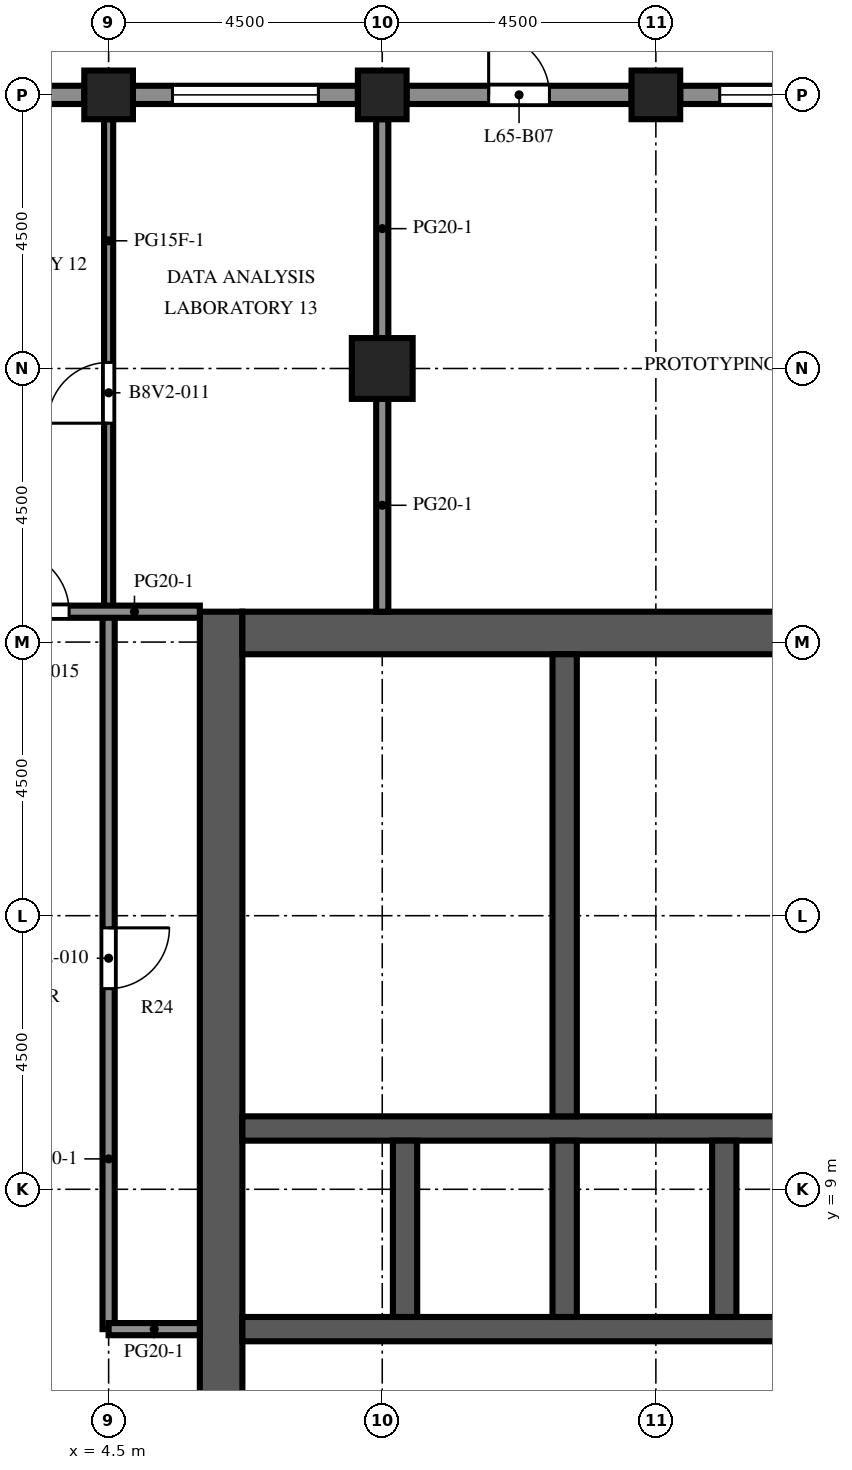
"""IFC4 building model, lengths in metres.
Left out: names, types, materials, properties, quantities, classifications, styles, units other than length and angle.
Written with IfcOpenShell. Run it as: python <this file> out.ifc"""

import sys

from ifc_helpers import new_model, si_unit, direction, frame, frame_2d, origin, origin_2d, place, context, subcontext, project, spatial, rectangle, extrude, element, fill, save


model = new_model("IFC4")
c1 = context("Model", 3, precision=1e-05, world=origin(), true_north=direction((0.0, 1.0)))
c2 = subcontext(c1, "Body", "Model", "MODEL_VIEW")
j1 = project(units=[si_unit("LENGTHUNIT", "METRE"), si_unit("PLANEANGLEUNIT", "RADIAN")], contexts=[c1])
p1 = place(None, origin())
s1 = spatial("IfcSite", under=j1, at=p1, CompositionType="ELEMENT")
p2 = place(p1, origin())
s2 = spatial("IfcBuilding", under=s1, at=p2, CompositionType="ELEMENT")
p3 = place(p2, frame((0.0, 0.0, 286.8)))
s3 = spatial("IfcBuildingStorey", under=s2, at=p3, CompositionType="ELEMENT", Elevation=286.8)
for number, where, z_axis, x_axis in (
    (1, (4.5, 27.0, 0.0), (0.0, 0.0, 1.0), (1.0, 0.0, 0.0)),
    (2, (9.0, 27.0, 0.0), (0.0, 0.0, 1.0), (1.0, 0.0, 0.0)),
    (3, (13.5, 27.0, 0.0), (0.0, 0.0, 1.0), (1.0, 0.0, 0.0)),
):
    element("IfcColumn", number, at=place(p3, frame(where, z_axis=z_axis, x_axis=x_axis)), inside=s3, PredefinedType="COLUMN", context=c2, shape_type="SweptSolid", body=[
        extrude(rectangle(XDim=0.8, YDim=0.8, at=origin_2d()), origin(), (0.0, 0.0, 1.0), 4.1),
    ])
p4 = place(p3, frame((9.0, 22.5, 0.0), z_axis=(0.0, 0.0, 1.0), x_axis=(1.0, 0.0, 0.0)))
e4 = element("IfcColumn", 4, at=p4, inside=s3, PredefinedType="COLUMN", context=c2, shape_type="SweptSolid", body=[
    extrude(rectangle(XDim=1.0, YDim=1.0, at=origin_2d()), origin(), (0.0, 0.0, 1.0), 4.1),
])
p5 = place(p3, frame((6.35, -9.0, 0.0), z_axis=(0.0, 0.0, 1.0), x_axis=(0.0, 1.0, 0.0)))
e5 = element("IfcWall", 5, at=p5, inside=s3, PredefinedType="SHEAR", context=c2, shape_type="SweptSolid", body=[
    extrude(rectangle(XDim=27.5, YDim=0.7, at=frame_2d((13.75, 0.0))), origin(), (0.0, 0.0, 1.0), 4.1),
])
p6 = place(p5, frame((12.55, 0.0, 0.0)))
e6 = element("IfcOpeningElement", 6, at=p6, cuts=e5, PredefinedType="OPENING", context=c2, shape_type="SweptSolid", body=[
    extrude(rectangle(XDim=2.4, YDim=2.4, at=frame_2d((1.2, 1.2))), frame((0.0, 0.36, 0.0), z_axis=(0.0, -1.0, 0.0), x_axis=(1.0, 0.0, 0.0)), (0.0, 0.0, 1.0), 0.72),
])
p7 = place(p5, frame((3.9, 0.0, 0.0)))
e7 = element("IfcOpeningElement", 7, at=p7, cuts=e5, PredefinedType="OPENING", context=c2, shape_type="SweptSolid", body=[
    extrude(rectangle(XDim=1.2, YDim=2.1, at=frame_2d((0.6, 1.05))), frame((0.0, 0.36, 0.0), z_axis=(0.0, -1.0, 0.0), x_axis=(1.0, 0.0, 0.0)), (0.0, 0.0, 1.0), 0.72),
])
p8 = place(p5, frame((22.4, 0.0, 0.0)))
e8 = element("IfcOpeningElement", 8, at=p8, cuts=e5, PredefinedType="OPENING", context=c2, shape_type="SweptSolid", body=[
    extrude(rectangle(XDim=1.2, YDim=2.1, at=frame_2d((0.6, 1.05))), frame((0.0, 0.36, 0.0), z_axis=(0.0, -1.0, 0.0), x_axis=(1.0, 0.0, 0.0)), (0.0, 0.0, 1.0), 0.72),
])
p9 = place(p3, frame((6.7, 18.15, 0.0), z_axis=(0.0, 0.0, 1.0), x_axis=(1.0, 0.0, 0.0)))
e9 = element("IfcWall", 9, at=p9, inside=s3, PredefinedType="SHEAR", context=c2, shape_type="SweptSolid", body=[
    extrude(rectangle(XDim=10.6, YDim=0.7, at=frame_2d((5.3, 0.0))), origin(), (0.0, 0.0, 1.0), 4.1),
])
p10 = place(p3, frame((6.7, 6.7, 0.0), z_axis=(0.0, 0.0, 1.0), x_axis=(1.0, 0.0, 0.0)))
e10 = element("IfcWall", 10, at=p10, inside=s3, PredefinedType="SHEAR", context=c2, shape_type="SweptSolid", body=[
    extrude(rectangle(XDim=10.6, YDim=0.4, at=frame_2d((5.3, 0.0))), origin(), (0.0, 0.0, 1.0), 4.1),
])
p11 = place(p10, frame((3.438, 0.0, 0.0)))
e11 = element("IfcOpeningElement", 11, at=p11, cuts=e10, PredefinedType="OPENING", context=c2, shape_type="SweptSolid", body=[
    extrude(rectangle(XDim=1.1, YDim=2.1, at=frame_2d((0.55, 1.05))), frame((0.0, 0.21, 0.0), z_axis=(0.0, -1.0, 0.0), x_axis=(1.0, 0.0, 0.0)), (0.0, 0.0, 1.0), 0.42),
])
p12 = place(p10, frame((6.062, 0.0, 0.0)))
e12 = element("IfcOpeningElement", 12, at=p12, cuts=e10, PredefinedType="OPENING", context=c2, shape_type="SweptSolid", body=[
    extrude(rectangle(XDim=1.1, YDim=2.1, at=frame_2d((0.55, 1.05))), frame((0.0, 0.21, 0.0), z_axis=(0.0, -1.0, 0.0), x_axis=(1.0, 0.0, 0.0)), (0.0, 0.0, 1.0), 0.42),
])
p13 = place(p10, frame((8.812, 0.0, 0.0)))
e13 = element("IfcOpeningElement", 13, at=p13, cuts=e10, PredefinedType="OPENING", context=c2, shape_type="SweptSolid", body=[
    extrude(rectangle(XDim=1.1, YDim=2.1, at=frame_2d((0.55, 1.05))), frame((0.0, 0.21, 0.0), z_axis=(0.0, -1.0, 0.0), x_axis=(1.0, 0.0, 0.0)), (0.0, 0.0, 1.0), 0.42),
])
p14 = place(p10, frame((0.738, 0.0, 0.0)))
e14 = element("IfcOpeningElement", 14, at=p14, cuts=e10, PredefinedType="OPENING", context=c2, shape_type="SweptSolid", body=[
    extrude(rectangle(XDim=1.0, YDim=2.1, at=frame_2d((0.5, 1.05))), frame((0.0, 0.21, 0.0), z_axis=(0.0, -1.0, 0.0), x_axis=(1.0, 0.0, 0.0)), (0.0, 0.0, 1.0), 0.42),
])
p15 = place(p3, frame((6.7, 10.0, 0.0), z_axis=(0.0, 0.0, 1.0), x_axis=(1.0, 0.0, 0.0)))
e15 = element("IfcWall", 15, at=p15, inside=s3, PredefinedType="SHEAR", context=c2, shape_type="SweptSolid", body=[
    extrude(rectangle(XDim=10.6, YDim=0.4, at=frame_2d((5.3, 0.0))), origin(), (0.0, 0.0, 1.0), 4.1),
])
for number, where, z_axis, x_axis in (
    (16, (9.375, 6.9, 0.0), (0.0, 0.0, 1.0), (0.0, 1.0, 0.0)),
    (17, (12.0, 6.9, 0.0), (0.0, 0.0, 1.0), (0.0, 1.0, 0.0)),
    (18, (14.625, 6.9, 0.0), (0.0, 0.0, 1.0), (0.0, 1.0, 0.0)),
):
    element("IfcWall", number, at=place(p3, frame(where, z_axis=z_axis, x_axis=x_axis)), inside=s3, PredefinedType="SHEAR", context=c2, shape_type="SweptSolid", body=[
        extrude(rectangle(XDim=2.9, YDim=0.4, at=frame_2d((1.45, 0.0))), origin(), (0.0, 0.0, 1.0), 4.1),
    ])
p16 = place(p3, frame((12.0, 10.2, 0.0), z_axis=(0.0, 0.0, 1.0), x_axis=(0.0, 1.0, 0.0)))
e19 = element("IfcWall", 19, at=p16, inside=s3, PredefinedType="SHEAR", context=c2, shape_type="SweptSolid", body=[
    extrude(rectangle(XDim=7.6, YDim=0.4, at=frame_2d((3.8, 0.0))), origin(), (0.0, 0.0, 1.0), 4.1),
])
p17 = place(p3, frame((13.9, 27.0, 0.0), z_axis=(0.0, 0.0, 1.0), x_axis=(1.0, 0.0, 0.0)))
e20 = element("IfcWall", 20, at=p17, inside=s3, PredefinedType="SOLIDWALL", context=c2, shape_type="SweptSolid", body=[
    extrude(rectangle(XDim=3.7, YDim=0.3, at=frame_2d((1.85, 0.0))), origin(), (0.0, 0.0, 1.0), 2.85),
])
p18 = place(p17, frame((0.65, 0.0, 0.8)))
e21 = element("IfcOpeningElement", 21, at=p18, cuts=e20, PredefinedType="OPENING", context=c2, shape_type="SweptSolid", body=[
    extrude(rectangle(XDim=2.4, YDim=1.7, at=frame_2d((1.2, 0.85))), frame((0.0, 0.16, 0.0), z_axis=(0.0, -1.0, 0.0), x_axis=(1.0, 0.0, 0.0)), (0.0, 0.0, 1.0), 0.32),
])
p19 = place(p3, frame((9.4, 27.0, 0.0), z_axis=(0.0, 0.0, 1.0), x_axis=(1.0, 0.0, 0.0)))
e22 = element("IfcWall", 22, at=p19, inside=s3, PredefinedType="SOLIDWALL", context=c2, shape_type="SweptSolid", body=[
    extrude(rectangle(XDim=3.7, YDim=0.3, at=frame_2d((1.85, 0.0))), origin(), (0.0, 0.0, 1.0), 2.85),
])
p20 = place(p19, frame((1.35, 0.0, 0.0)))
e23 = element("IfcOpeningElement", 23, at=p20, cuts=e22, PredefinedType="OPENING", context=c2, shape_type="SweptSolid", body=[
    extrude(rectangle(XDim=1.0, YDim=2.2, at=frame_2d((0.5, 1.1))), frame((0.0, 0.16, 0.0), z_axis=(0.0, -1.0, 0.0), x_axis=(1.0, 0.0, 0.0)), (0.0, 0.0, 1.0), 0.32),
])
p21 = place(p3, frame((4.9, 27.0, 0.0), z_axis=(0.0, 0.0, 1.0), x_axis=(1.0, 0.0, 0.0)))
e24 = element("IfcWall", 24, at=p21, inside=s3, PredefinedType="SOLIDWALL", context=c2, shape_type="SweptSolid", body=[
    extrude(rectangle(XDim=3.7, YDim=0.3, at=frame_2d((1.85, 0.0))), origin(), (0.0, 0.0, 1.0), 2.85),
])
p22 = place(p21, frame((0.65, 0.0, 0.8)))
e25 = element("IfcOpeningElement", 25, at=p22, cuts=e24, PredefinedType="OPENING", context=c2, shape_type="SweptSolid", body=[
    extrude(rectangle(XDim=2.4, YDim=1.7, at=frame_2d((1.2, 0.85))), frame((0.0, 0.16, 0.0), z_axis=(0.0, -1.0, 0.0), x_axis=(1.0, 0.0, 0.0)), (0.0, 0.0, 1.0), 0.32),
])
p23 = place(p3, frame((0.4, 27.0, 0.0), z_axis=(0.0, 0.0, 1.0), x_axis=(1.0, 0.0, 0.0)))
e26 = element("IfcWall", 26, at=p23, inside=s3, PredefinedType="SOLIDWALL", context=c2, shape_type="SweptSolid", body=[
    extrude(rectangle(XDim=3.7, YDim=0.3, at=frame_2d((1.85, 0.0))), origin(), (0.0, 0.0, 1.0), 2.85),
])
p24 = place(p23, frame((0.65, 0.0, 0.8)))
e27 = element("IfcOpeningElement", 27, at=p24, cuts=e26, PredefinedType="OPENING", context=c2, shape_type="SweptSolid", body=[
    extrude(rectangle(XDim=2.4, YDim=1.7, at=frame_2d((1.2, 0.85))), frame((0.0, 0.16, 0.0), z_axis=(0.0, -1.0, 0.0), x_axis=(1.0, 0.0, 0.0)), (0.0, 0.0, 1.0), 0.32),
])
p25 = place(p3, frame((8.1, 10.2, 0.0), z_axis=(0.0, 0.0, 1.0), x_axis=(0.0, 1.0, 0.0)))
e28 = element("IfcWall", 28, at=p25, inside=s3, PredefinedType="PARTITIONING", context=c2, shape_type="SweptSolid", body=[
    extrude(rectangle(XDim=2.28, YDim=0.1, at=frame_2d((1.14, 0.0))), origin(), (0.0, 0.0, 1.0), 3.65),
])
p26 = place(p25, frame((0.64, 0.0, 0.0)))
e29 = element("IfcOpeningElement", 29, at=p26, cuts=e28, PredefinedType="OPENING", context=c2, shape_type="SweptSolid", body=[
    extrude(rectangle(XDim=1.0, YDim=2.1, at=frame_2d((0.5, 1.05))), frame((0.0, 0.06, 0.0), z_axis=(0.0, -1.0, 0.0), x_axis=(1.0, 0.0, 0.0)), (0.0, 0.0, 1.0), 0.12),
])
p27 = place(p3, frame((8.1, 12.48, 0.0), z_axis=(0.0, 0.0, 1.0), x_axis=(0.0, 1.0, 0.0)))
e30 = element("IfcWall", 30, at=p27, inside=s3, PredefinedType="PARTITIONING", context=c2, shape_type="SweptSolid", body=[
    extrude(rectangle(XDim=2.432, YDim=0.1, at=frame_2d((1.216, 0.0))), origin(), (0.0, 0.0, 1.0), 3.65),
])
p28 = place(p27, frame((0.716, 0.0, 0.0)))
e31 = element("IfcOpeningElement", 31, at=p28, cuts=e30, PredefinedType="OPENING", context=c2, shape_type="SweptSolid", body=[
    extrude(rectangle(XDim=1.0, YDim=2.1, at=frame_2d((0.5, 1.05))), frame((0.0, 0.06, 0.0), z_axis=(0.0, -1.0, 0.0), x_axis=(1.0, 0.0, 0.0)), (0.0, 0.0, 1.0), 0.12),
])
p29 = place(p3, frame((8.1, 14.912, 0.0), z_axis=(0.0, 0.0, 1.0), x_axis=(0.0, 1.0, 0.0)))
e32 = element("IfcWall", 32, at=p29, inside=s3, PredefinedType="PARTITIONING", context=c2, shape_type="SweptSolid", body=[
    extrude(rectangle(XDim=2.888, YDim=0.1, at=frame_2d((1.444, 0.0))), origin(), (0.0, 0.0, 1.0), 3.65),
])
p30 = place(p29, frame((0.944, 0.0, 0.0)))
e33 = element("IfcOpeningElement", 33, at=p30, cuts=e32, PredefinedType="OPENING", context=c2, shape_type="SweptSolid", body=[
    extrude(rectangle(XDim=1.0, YDim=2.1, at=frame_2d((0.5, 1.05))), frame((0.0, 0.06, 0.0), z_axis=(0.0, -1.0, 0.0), x_axis=(1.0, 0.0, 0.0)), (0.0, 0.0, 1.0), 0.12),
])
for number, where, z_axis, x_axis in (
    (34, (8.1, 12.48, 0.0), (0.0, 0.0, 1.0), (1.0, 0.0, 0.0)),
    (35, (8.1, 14.912, 0.0), (0.0, 0.0, 1.0), (1.0, 0.0, 0.0)),
):
    element("IfcWall", number, at=place(p3, frame(where, z_axis=z_axis, x_axis=x_axis)), inside=s3, PredefinedType="PARTITIONING", context=c2, shape_type="SweptSolid", body=[
        extrude(rectangle(XDim=3.7, YDim=0.1, at=frame_2d((1.85, 0.0))), origin(), (0.0, 0.0, 1.0), 3.65),
    ])
p31 = place(p3, frame((4.5, 26.6, 0.0), z_axis=(0.0, 0.0, 1.0), x_axis=(0.0, -1.0, 0.0)))
e36 = element("IfcWall", 36, at=p31, inside=s3, PredefinedType="PARTITIONING", context=c2, shape_type="SweptSolid", body=[
    extrude(rectangle(XDim=8.1, YDim=0.15, at=frame_2d((4.05, 0.0))), origin(), (0.0, 0.0, 1.0), 3.65),
])
p32 = place(p31, frame((4.0, 0.0, 0.0)))
e37 = element("IfcOpeningElement", 37, at=p32, cuts=e36, PredefinedType="OPENING", context=c2, shape_type="SweptSolid", body=[
    extrude(rectangle(XDim=1.0, YDim=2.1, at=frame_2d((0.5, 1.05))), frame((0.0, 0.085, 0.0), z_axis=(0.0, -1.0, 0.0), x_axis=(1.0, 0.0, 0.0)), (0.0, 0.0, 1.0), 0.17),
])
p33 = place(p3, frame((4.5, 18.5, 0.0), z_axis=(0.0, 0.0, 1.0), x_axis=(0.0, -1.0, 0.0)))
e38 = element("IfcWall", 38, at=p33, inside=s3, PredefinedType="PARTITIONING", context=c2, shape_type="SweptSolid", body=[
    extrude(rectangle(XDim=11.8, YDim=0.2, at=frame_2d((5.9, 0.0))), origin(), (0.0, 0.0, 1.0), 3.65),
])
p34 = place(p33, frame((5.2, 0.0, 0.0)))
e39 = element("IfcOpeningElement", 39, at=p34, cuts=e38, PredefinedType="OPENING", context=c2, shape_type="SweptSolid", body=[
    extrude(rectangle(XDim=1.0, YDim=2.1, at=frame_2d((0.5, 1.05))), frame((0.0, 0.11, 0.0), z_axis=(0.0, -1.0, 0.0), x_axis=(1.0, 0.0, 0.0)), (0.0, 0.0, 1.0), 0.22),
])
p35 = place(p3, frame((9.0, 18.5, 0.0), z_axis=(0.0, 0.0, 1.0), x_axis=(0.0, 1.0, 0.0)))
e40 = element("IfcWall", 40, at=p35, inside=s3, PredefinedType="PARTITIONING", context=c2, shape_type="SweptSolid", body=[
    extrude(rectangle(XDim=3.5, YDim=0.2, at=frame_2d((1.75, 0.0))), origin(), (0.0, 0.0, 1.0), 3.65),
])
p36 = place(p3, frame((9.0, 23.0, 0.0), z_axis=(0.0, 0.0, 1.0), x_axis=(0.0, 1.0, 0.0)))
e41 = element("IfcWall", 41, at=p36, inside=s3, PredefinedType="PARTITIONING", context=c2, shape_type="SweptSolid", body=[
    extrude(rectangle(XDim=3.6, YDim=0.2, at=frame_2d((1.8, 0.0))), origin(), (0.0, 0.0, 1.0), 3.65),
])
p37 = place(p3, frame((4.5, 6.7, 0.0), z_axis=(0.0, 0.0, 1.0), x_axis=(1.0, 0.0, 0.0)))
e42 = element("IfcWall", 42, at=p37, inside=s3, PredefinedType="PARTITIONING", context=c2, shape_type="SweptSolid", body=[
    extrude(rectangle(XDim=1.5, YDim=0.2, at=frame_2d((0.75, 0.0))), origin(), (0.0, 0.0, 1.0), 3.65),
])
p38 = place(p3, frame((1.5, 18.5, 0.0), z_axis=(0.0, 0.0, 1.0), x_axis=(1.0, 0.0, 0.0)))
e43 = element("IfcWall", 43, at=p38, inside=s3, PredefinedType="PARTITIONING", context=c2, shape_type="SweptSolid", body=[
    extrude(rectangle(XDim=4.5, YDim=0.2, at=frame_2d((2.25, 0.0))), origin(), (0.0, 0.0, 1.0), 3.65),
])
p39 = place(p38, frame((1.35, 0.0, 0.0)))
e44 = element("IfcOpeningElement", 44, at=p39, cuts=e43, PredefinedType="OPENING", context=c2, shape_type="SweptSolid", body=[
    extrude(rectangle(XDim=1.0, YDim=2.1, at=frame_2d((0.5, 1.05))), frame((0.0, 0.11, 0.0), z_axis=(0.0, -1.0, 0.0), x_axis=(1.0, 0.0, 0.0)), (0.0, 0.0, 1.0), 0.22),
])
p40 = place(p18, origin())
e45 = element("IfcWindow", 45, at=p40, inside=s3, PartitioningType="SINGLE_PANEL", PredefinedType="WINDOW", context=c2, shape_type="SweptSolid", body=[
    extrude(rectangle(XDim=2.4, YDim=1.7, at=frame_2d((1.2, 0.85))), frame((0.0, 0.03, 0.0), z_axis=(0.0, -1.0, 0.0), x_axis=(1.0, 0.0, 0.0)), (0.0, 0.0, 1.0), 0.06),
])
fill(e21, e45)
p41 = place(p20, origin())
e46 = element("IfcDoor", 46, at=p41, inside=s3, OperationType="SINGLE_SWING_LEFT", PredefinedType="DOOR", context=c2, shape_type="SweptSolid", body=[
    extrude(rectangle(XDim=1.0, YDim=2.2, at=frame_2d((0.5, 1.1))), frame((0.0, 0.025, 0.0), z_axis=(0.0, -1.0, 0.0), x_axis=(1.0, 0.0, 0.0)), (0.0, 0.0, 1.0), 0.05),
])
fill(e23, e46)
p42 = place(p22, origin())
e47 = element("IfcWindow", 47, at=p42, inside=s3, PartitioningType="SINGLE_PANEL", PredefinedType="WINDOW", context=c2, shape_type="SweptSolid", body=[
    extrude(rectangle(XDim=2.4, YDim=1.7, at=frame_2d((1.2, 0.85))), frame((0.0, 0.03, 0.0), z_axis=(0.0, -1.0, 0.0), x_axis=(1.0, 0.0, 0.0)), (0.0, 0.0, 1.0), 0.06),
])
fill(e25, e47)
p43 = place(p11, origin())
e48 = element("IfcDoor", 48, at=p43, inside=s3, OperationType="DOUBLE_DOOR_SLIDING", PredefinedType="DOOR", context=c2, shape_type="SweptSolid", body=[
    extrude(rectangle(XDim=1.1, YDim=2.1, at=frame_2d((0.55, 1.05))), frame((0.0, 0.025, 0.0), z_axis=(0.0, -1.0, 0.0), x_axis=(1.0, 0.0, 0.0)), (0.0, 0.0, 1.0), 0.05),
])
fill(e11, e48)
p44 = place(p12, origin())
e49 = element("IfcDoor", 49, at=p44, inside=s3, OperationType="DOUBLE_DOOR_SLIDING", PredefinedType="DOOR", context=c2, shape_type="SweptSolid", body=[
    extrude(rectangle(XDim=1.1, YDim=2.1, at=frame_2d((0.55, 1.05))), frame((0.0, 0.025, 0.0), z_axis=(0.0, -1.0, 0.0), x_axis=(1.0, 0.0, 0.0)), (0.0, 0.0, 1.0), 0.05),
])
fill(e12, e49)
p45 = place(p6, origin())
e50 = element("IfcDoor", 50, at=p45, inside=s3, OperationType="DOUBLE_DOOR_DOUBLE_SWING", PredefinedType="DOOR", context=c2, shape_type="SweptSolid", body=[
    extrude(rectangle(XDim=2.4, YDim=2.4, at=frame_2d((1.2, 1.2))), frame((0.0, 0.025, 0.0), z_axis=(0.0, -1.0, 0.0), x_axis=(1.0, 0.0, 0.0)), (0.0, 0.0, 1.0), 0.05),
])
fill(e6, e50)
p46 = place(p14, origin())
e51 = element("IfcDoor", 51, at=p46, inside=s3, OperationType="SINGLE_SWING_LEFT", PredefinedType="DOOR", context=c2, shape_type="SweptSolid", body=[
    extrude(rectangle(XDim=1.0, YDim=2.1, at=frame_2d((0.5, 1.05))), frame((0.0, 0.025, 0.0), z_axis=(0.0, -1.0, 0.0), x_axis=(1.0, 0.0, 0.0)), (0.0, 0.0, 1.0), 0.05),
])
fill(e14, e51)
p47 = place(p8, origin())
e52 = element("IfcDoor", 52, at=p47, inside=s3, OperationType="SINGLE_SWING_RIGHT", PredefinedType="DOOR", context=c2, shape_type="SweptSolid", body=[
    extrude(rectangle(XDim=1.2, YDim=2.1, at=frame_2d((0.6, 1.05))), frame((0.0, -0.275, 0.0), z_axis=(0.0, -1.0, 0.0), x_axis=(1.0, 0.0, 0.0)), (0.0, 0.0, 1.0), 0.05),
])
fill(e8, e52)
p48 = place(p26, origin())
e53 = element("IfcDoor", 53, at=p48, inside=s3, OperationType="SINGLE_SWING_LEFT", PredefinedType="DOOR", context=c2, shape_type="SweptSolid", body=[
    extrude(rectangle(XDim=1.0, YDim=2.1, at=frame_2d((0.5, 1.05))), frame((0.0, 0.025, 0.0), z_axis=(0.0, -1.0, 0.0), x_axis=(1.0, 0.0, 0.0)), (0.0, 0.0, 1.0), 0.05),
])
fill(e29, e53)
p49 = place(p28, origin())
e54 = element("IfcDoor", 54, at=p49, inside=s3, OperationType="SINGLE_SWING_RIGHT", PredefinedType="DOOR", context=c2, shape_type="SweptSolid", body=[
    extrude(rectangle(XDim=1.0, YDim=2.1, at=frame_2d((0.5, 1.05))), frame((0.0, 0.025, 0.0), z_axis=(0.0, -1.0, 0.0), x_axis=(1.0, 0.0, 0.0)), (0.0, 0.0, 1.0), 0.05),
])
fill(e31, e54)
p50 = place(p30, origin())
e55 = element("IfcDoor", 55, at=p50, inside=s3, OperationType="SINGLE_SWING_LEFT", PredefinedType="DOOR", context=c2, shape_type="SweptSolid", body=[
    extrude(rectangle(XDim=1.0, YDim=2.1, at=frame_2d((0.5, 1.05))), frame((0.0, 0.025, 0.0), z_axis=(0.0, -1.0, 0.0), x_axis=(1.0, 0.0, 0.0)), (0.0, 0.0, 1.0), 0.05),
])
fill(e33, e55)
p51 = place(p34, origin())
e56 = element("IfcDoor", 56, at=p51, inside=s3, OperationType="SINGLE_SWING_LEFT", PredefinedType="DOOR", context=c2, shape_type="SweptSolid", body=[
    extrude(rectangle(XDim=1.0, YDim=2.1, at=frame_2d((0.5, 1.05))), frame((0.0, 0.025, 0.0), z_axis=(0.0, -1.0, 0.0), x_axis=(1.0, 0.0, 0.0)), (0.0, 0.0, 1.0), 0.05),
])
fill(e39, e56)
p52 = place(p32, origin())
e57 = element("IfcDoor", 57, at=p52, inside=s3, OperationType="SINGLE_SWING_RIGHT", PredefinedType="DOOR", context=c2, shape_type="SweptSolid", body=[
    extrude(rectangle(XDim=1.0, YDim=2.1, at=frame_2d((0.5, 1.05))), frame((0.0, 0.025, 0.0), z_axis=(0.0, -1.0, 0.0), x_axis=(1.0, 0.0, 0.0)), (0.0, 0.0, 1.0), 0.05),
])
fill(e37, e57)
p53 = place(p39, origin())
e58 = element("IfcDoor", 58, at=p53, inside=s3, OperationType="SINGLE_SWING_LEFT", PredefinedType="DOOR", context=c2, shape_type="SweptSolid", body=[
    extrude(rectangle(XDim=1.0, YDim=2.1, at=frame_2d((0.5, 1.05))), frame((0.0, 0.025, 0.0), z_axis=(0.0, -1.0, 0.0), x_axis=(1.0, 0.0, 0.0)), (0.0, 0.0, 1.0), 0.05),
])
fill(e44, e58)
save(model, sys.argv[1])
